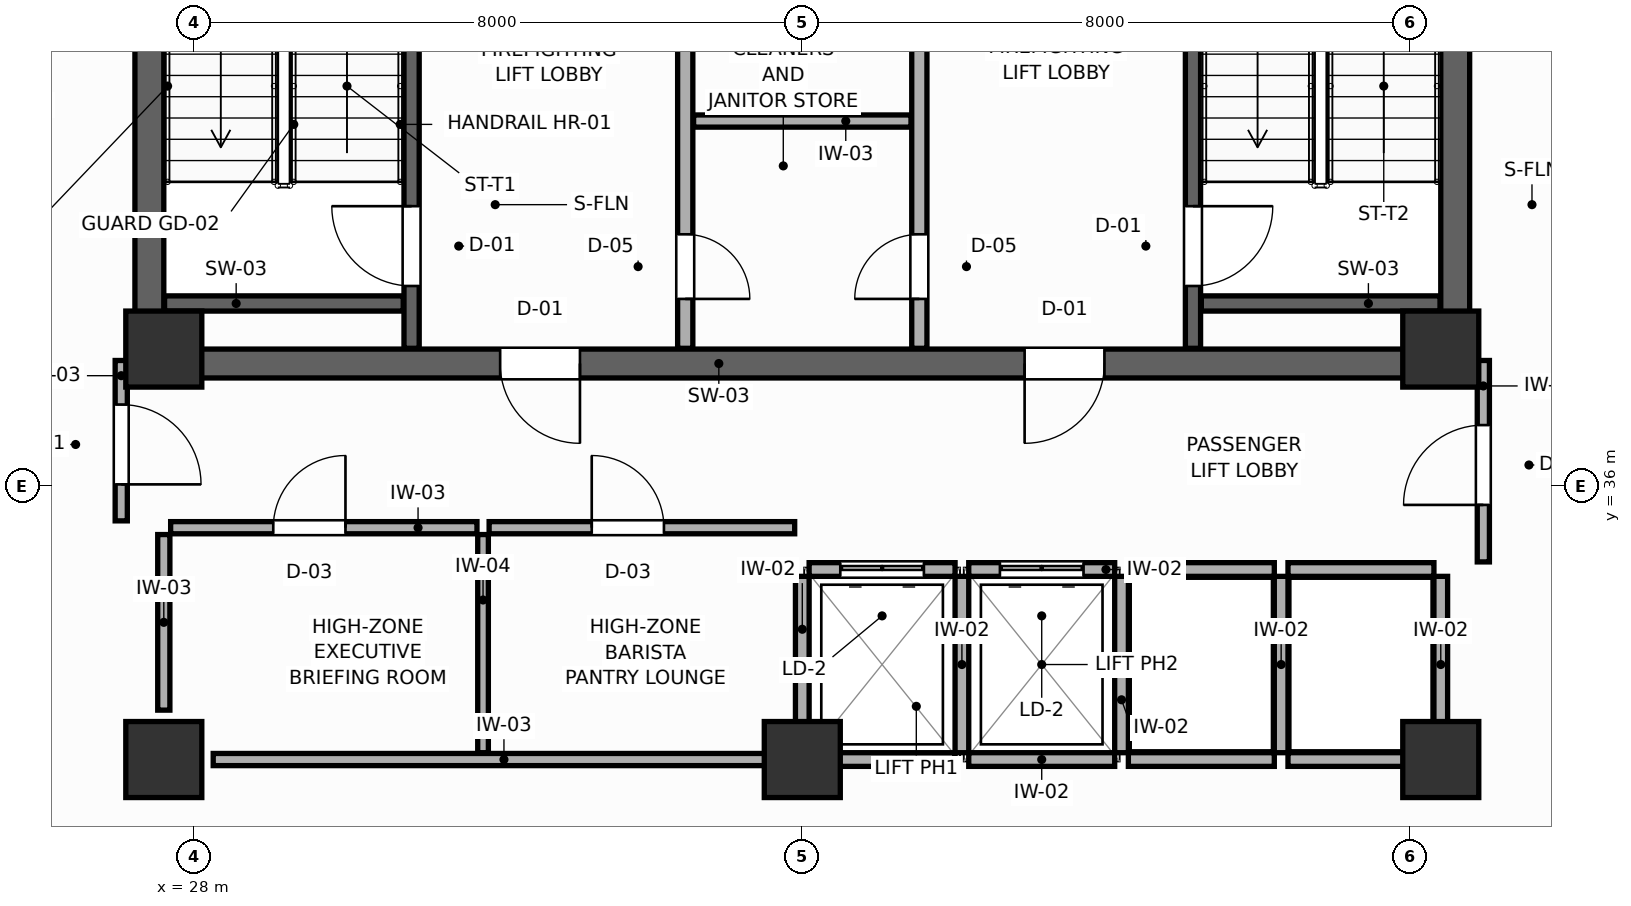
"""IFC4 building model, lengths in metres.
Left out: names, types, materials, properties, quantities, classifications, styles, units other than length and angle.
Written with IfcOpenShell. Run it as: python <this file> out.ifc"""

import sys

from ifc_helpers import new_model, si_unit, direction, frame, frame_2d, origin, origin_2d, place, context, subcontext, project, spatial, rectangle, extrude, source, transform, mapped, element, fill, save


model = new_model("IFC4")
c1 = context("Model", 3, precision=1e-05, world=origin(), true_north=direction((0.0, 1.0)))
c2 = subcontext(c1, "Body", "Model", "MODEL_VIEW")
j1 = project(units=[si_unit("LENGTHUNIT", "METRE"), si_unit("PLANEANGLEUNIT", "RADIAN")], contexts=[c1])
p1 = place(None, origin())
s1 = spatial("IfcSite", under=j1, at=p1, CompositionType="ELEMENT")
p2 = place(p1, origin())
s2 = spatial("IfcBuilding", under=s1, at=p2, CompositionType="ELEMENT")
p3 = place(p2, frame((0.0, 0.0, 213.0)))
s3 = spatial("IfcBuildingStorey", under=s2, at=p3, CompositionType="ELEMENT", Elevation=213.0)
p4 = place(p3, frame((27.22, 37.61, 0.0), z_axis=(0.0, 0.0, 1.0), x_axis=(1.0, 0.0, 0.0)))
e1 = element("IfcWall", 1, at=p4, inside=s3, PredefinedType="SHEAR", context=c2, shape_type="SweptSolid", body=[
    extrude(rectangle(XDim=17.56, YDim=0.38, at=frame_2d((8.78, 0.0))), origin(), (0.0, 0.0, 1.0), 3.6),
])
p5 = place(p4, frame((4.805, 0.0, 0.0)))
e2 = element("IfcOpeningElement", 2, at=p5, cuts=e1, PredefinedType="OPENING", context=c2, shape_type="SweptSolid", body=[
    extrude(rectangle(XDim=1.05, YDim=2.1, at=frame_2d((0.525, 1.05))), frame((0.0, 0.2, 0.0), z_axis=(0.0, -1.0, 0.0), x_axis=(1.0, 0.0, 0.0)), (0.0, 0.0, 1.0), 0.4),
])
p6 = place(p4, frame((11.705, 0.0, 0.0)))
e3 = element("IfcOpeningElement", 3, at=p6, cuts=e1, PredefinedType="OPENING", context=c2, shape_type="SweptSolid", body=[
    extrude(rectangle(XDim=1.05, YDim=2.1, at=frame_2d((0.525, 1.05))), frame((0.0, 0.2, 0.0), z_axis=(0.0, -1.0, 0.0), x_axis=(1.0, 0.0, 0.0)), (0.0, 0.0, 1.0), 0.4),
])
for number, where, z_axis, x_axis in (
    (4, (27.41, 37.8, 0.0), (0.0, 0.0, 1.0), (0.0, 1.0, 0.0)),
    (5, (44.59, 37.8, 0.0), (0.0, 0.0, 1.0), (0.0, 1.0, 0.0)),
):
    element("IfcWall", number, at=place(p3, frame(where, z_axis=z_axis, x_axis=x_axis)), inside=s3, PredefinedType="SHEAR", context=c2, shape_type="SweptSolid", body=[
        extrude(rectangle(XDim=9.0, YDim=0.38, at=frame_2d((4.5, 0.0))), origin(), (0.0, 0.0, 1.0), 3.6),
    ])
m1 = source(origin(), c2, "Body", "SweptSolid", [
    extrude(rectangle(XDim=1.0, YDim=1.0, at=origin_2d()), origin(), (0.0, 0.0, 1.0), 3.6),
])
for number, where, z_axis, x_axis in (
    (6, (27.6, 37.8, 0.0), (0.0, 0.0, 1.0), (1.0, 0.0, 0.0)),
    (7, (44.4, 37.8, 0.0), (0.0, 0.0, 1.0), (1.0, 0.0, 0.0)),
    (8, (27.6, 32.4, 0.0), (0.0, 0.0, 1.0), (1.0, 0.0, 0.0)),
    (9, (44.4, 32.4, 0.0), (0.0, 0.0, 1.0), (1.0, 0.0, 0.0)),
    (10, (36.0, 32.4, 0.0), (0.0, 0.0, 1.0), (1.0, 0.0, 0.0)),
):
    element("IfcColumn", number, at=place(p3, frame(where, z_axis=z_axis, x_axis=x_axis)), inside=s3, PredefinedType="COLUMN", context=c2, shape_type="MappedRepresentation", body=[
        mapped(m1, transform((0.0, 0.0, 0.0), scale=1.0)),
    ])
p7 = place(p3, frame((30.86, 37.81, 0.0), z_axis=(0.0, 0.0, 1.0), x_axis=(0.0, 1.0, 0.0)))
e11 = element("IfcWall", 11, at=p7, inside=s3, PredefinedType="SHEAR", context=c2, shape_type="SweptSolid", body=[
    extrude(rectangle(XDim=8.98, YDim=0.2, at=frame_2d((4.49, 0.0))), origin(), (0.0, 0.0, 1.0), 3.6),
])
p8 = place(p7, frame((0.82, 0.0, 0.0)))
e12 = element("IfcOpeningElement", 12, at=p8, cuts=e11, PredefinedType="OPENING", context=c2, shape_type="SweptSolid", body=[
    extrude(rectangle(XDim=1.05, YDim=2.1, at=frame_2d((0.525, 1.05))), frame((0.0, 0.11, 0.0), z_axis=(0.0, -1.0, 0.0), x_axis=(1.0, 0.0, 0.0)), (0.0, 0.0, 1.0), 0.22),
])
p9 = place(p3, frame((27.61, 38.4, 0.0), z_axis=(0.0, 0.0, 1.0), x_axis=(1.0, 0.0, 0.0)))
e13 = element("IfcWall", 13, at=p9, inside=s3, PredefinedType="SHEAR", context=c2, shape_type="SweptSolid", body=[
    extrude(rectangle(XDim=3.14, YDim=0.2, at=frame_2d((1.57, 0.0))), origin(), (0.0, 0.0, 1.0), 3.6),
])
p10 = place(p3, frame((41.14, 37.81, 0.0), z_axis=(0.0, 0.0, 1.0), x_axis=(0.0, 1.0, 0.0)))
e14 = element("IfcWall", 14, at=p10, inside=s3, PredefinedType="SHEAR", context=c2, shape_type="SweptSolid", body=[
    extrude(rectangle(XDim=8.98, YDim=0.2, at=frame_2d((4.49, 0.0))), origin(), (0.0, 0.0, 1.0), 3.6),
])
p11 = place(p10, frame((0.82, 0.0, 0.0)))
e15 = element("IfcOpeningElement", 15, at=p11, cuts=e14, PredefinedType="OPENING", context=c2, shape_type="SweptSolid", body=[
    extrude(rectangle(XDim=1.05, YDim=2.1, at=frame_2d((0.525, 1.05))), frame((0.0, 0.11, 0.0), z_axis=(0.0, -1.0, 0.0), x_axis=(1.0, 0.0, 0.0)), (0.0, 0.0, 1.0), 0.22),
])
p12 = place(p3, frame((41.25, 38.4, 0.0), z_axis=(0.0, 0.0, 1.0), x_axis=(1.0, 0.0, 0.0)))
e16 = element("IfcWall", 16, at=p12, inside=s3, PredefinedType="SHEAR", context=c2, shape_type="SweptSolid", body=[
    extrude(rectangle(XDim=3.14, YDim=0.2, at=frame_2d((1.57, 0.0))), origin(), (0.0, 0.0, 1.0), 3.6),
])
p13 = place(p3, frame((34.46, 37.81, 0.0), z_axis=(0.0, 0.0, 1.0), x_axis=(0.0, 1.0, 0.0)))
e17 = element("IfcWall", 17, at=p13, inside=s3, PredefinedType="PARTITIONING", context=c2, shape_type="SweptSolid", body=[
    extrude(rectangle(XDim=8.98, YDim=0.2, at=frame_2d((4.49, 0.0))), origin(), (0.0, 0.0, 1.0), 3.41),
])
p14 = place(p13, frame((0.65, 0.0, 0.0)))
e18 = element("IfcOpeningElement", 18, at=p14, cuts=e17, PredefinedType="OPENING", context=c2, shape_type="SweptSolid", body=[
    extrude(rectangle(XDim=0.85, YDim=2.05, at=frame_2d((0.425, 1.025))), frame((0.0, 0.11, 0.0), z_axis=(0.0, -1.0, 0.0), x_axis=(1.0, 0.0, 0.0)), (0.0, 0.0, 1.0), 0.22),
])
p15 = place(p3, frame((37.54, 37.81, 0.0), z_axis=(0.0, 0.0, 1.0), x_axis=(0.0, 1.0, 0.0)))
e19 = element("IfcWall", 19, at=p15, inside=s3, PredefinedType="PARTITIONING", context=c2, shape_type="SweptSolid", body=[
    extrude(rectangle(XDim=8.98, YDim=0.2, at=frame_2d((4.49, 0.0))), origin(), (0.0, 0.0, 1.0), 3.41),
])
p16 = place(p15, frame((0.65, 0.0, 0.0)))
e20 = element("IfcOpeningElement", 20, at=p16, cuts=e19, PredefinedType="OPENING", context=c2, shape_type="SweptSolid", body=[
    extrude(rectangle(XDim=0.85, YDim=2.05, at=frame_2d((0.425, 1.025))), frame((0.0, 0.11, 0.0), z_axis=(0.0, -1.0, 0.0), x_axis=(1.0, 0.0, 0.0)), (0.0, 0.0, 1.0), 0.22),
])
p17 = place(p3, frame((34.57, 40.8, 0.0), z_axis=(0.0, 0.0, 1.0), x_axis=(1.0, 0.0, 0.0)))
e21 = element("IfcWall", 21, at=p17, inside=s3, PredefinedType="PARTITIONING", context=c2, shape_type="SweptSolid", body=[
    extrude(rectangle(XDim=2.86, YDim=0.16, at=frame_2d((1.43, 0.0))), origin(), (0.0, 0.0, 1.0), 3.41),
])
p18 = place(p3, frame((36.09, 34.9, 0.0), z_axis=(0.0, 0.0, 1.0), x_axis=(1.0, 0.0, 0.0)))
e22 = element("IfcWall", 22, at=p18, inside=s3, PredefinedType="PARTITIONING", context=c2, shape_type="SweptSolid", body=[
    extrude(rectangle(XDim=1.92, YDim=0.18, at=frame_2d((0.96, 0.0))), origin(), (0.0, 0.0, 1.0), 3.41),
])
p19 = place(p18, frame((0.41, 0.0, 0.0)))
e23 = element("IfcOpeningElement", 23, at=p19, cuts=e22, PredefinedType="OPENING", context=c2, shape_type="SweptSolid", body=[
    extrude(rectangle(XDim=1.1, YDim=2.1, at=frame_2d((0.55, 1.05))), frame((0.0, 0.1, 0.0), z_axis=(0.0, -1.0, 0.0), x_axis=(1.0, 0.0, 0.0)), (0.0, 0.0, 1.0), 0.2),
])
p20 = place(p3, frame((36.09, 32.4, 0.0), z_axis=(0.0, 0.0, 1.0), x_axis=(1.0, 0.0, 0.0)))
e24 = element("IfcWall", 24, at=p20, inside=s3, PredefinedType="PARTITIONING", context=c2, shape_type="SweptSolid", body=[
    extrude(rectangle(XDim=1.92, YDim=0.18, at=frame_2d((0.96, 0.0))), origin(), (0.0, 0.0, 1.0), 2.17),
])
p21 = place(p3, frame((36.0, 32.49, 0.0), z_axis=(0.0, 0.0, 1.0), x_axis=(0.0, 1.0, 0.0)))
e25 = element("IfcWall", 25, at=p21, inside=s3, PredefinedType="PARTITIONING", context=c2, shape_type="SweptSolid", body=[
    extrude(rectangle(XDim=2.32, YDim=0.18, at=frame_2d((1.16, 0.0))), origin(), (0.0, 0.0, 1.0), 3.41),
])
p22 = place(p3, frame((38.19, 34.9, 0.0), z_axis=(0.0, 0.0, 1.0), x_axis=(1.0, 0.0, 0.0)))
e26 = element("IfcWall", 26, at=p22, inside=s3, PredefinedType="PARTITIONING", context=c2, shape_type="SweptSolid", body=[
    extrude(rectangle(XDim=1.92, YDim=0.18, at=frame_2d((0.96, 0.0))), origin(), (0.0, 0.0, 1.0), 3.41),
])
p23 = place(p22, frame((0.41, 0.0, 0.0)))
e27 = element("IfcOpeningElement", 27, at=p23, cuts=e26, PredefinedType="OPENING", context=c2, shape_type="SweptSolid", body=[
    extrude(rectangle(XDim=1.1, YDim=2.1, at=frame_2d((0.55, 1.05))), frame((0.0, 0.1, 0.0), z_axis=(0.0, -1.0, 0.0), x_axis=(1.0, 0.0, 0.0)), (0.0, 0.0, 1.0), 0.2),
])
p24 = place(p3, frame((38.19, 32.4, 0.0), z_axis=(0.0, 0.0, 1.0), x_axis=(1.0, 0.0, 0.0)))
e28 = element("IfcWall", 28, at=p24, inside=s3, PredefinedType="PARTITIONING", context=c2, shape_type="SweptSolid", body=[
    extrude(rectangle(XDim=1.92, YDim=0.18, at=frame_2d((0.96, 0.0))), origin(), (0.0, 0.0, 1.0), 2.17),
])
p25 = place(p3, frame((38.1, 32.49, 0.0), z_axis=(0.0, 0.0, 1.0), x_axis=(0.0, 1.0, 0.0)))
e29 = element("IfcWall", 29, at=p25, inside=s3, PredefinedType="PARTITIONING", context=c2, shape_type="SweptSolid", body=[
    extrude(rectangle(XDim=2.32, YDim=0.18, at=frame_2d((1.16, 0.0))), origin(), (0.0, 0.0, 1.0), 3.41),
])
p26 = place(p3, frame((40.29, 34.9, 0.0), z_axis=(0.0, 0.0, 1.0), x_axis=(1.0, 0.0, 0.0)))
e30 = element("IfcWall", 30, at=p26, inside=s3, PredefinedType="PARTITIONING", context=c2, shape_type="SweptSolid", body=[
    extrude(rectangle(XDim=1.92, YDim=0.18, at=frame_2d((0.96, 0.0))), origin(), (0.0, 0.0, 1.0), 3.41),
])
p27 = place(p3, frame((40.29, 32.4, 0.0), z_axis=(0.0, 0.0, 1.0), x_axis=(1.0, 0.0, 0.0)))
e31 = element("IfcWall", 31, at=p27, inside=s3, PredefinedType="PARTITIONING", context=c2, shape_type="SweptSolid", body=[
    extrude(rectangle(XDim=1.92, YDim=0.18, at=frame_2d((0.96, 0.0))), origin(), (0.0, 0.0, 1.0), 2.17),
])
p28 = place(p3, frame((40.2, 32.49, 0.0), z_axis=(0.0, 0.0, 1.0), x_axis=(0.0, 1.0, 0.0)))
e32 = element("IfcWall", 32, at=p28, inside=s3, PredefinedType="PARTITIONING", context=c2, shape_type="SweptSolid", body=[
    extrude(rectangle(XDim=2.32, YDim=0.18, at=frame_2d((1.16, 0.0))), origin(), (0.0, 0.0, 1.0), 3.41),
])
p29 = place(p3, frame((42.39, 34.9, 0.0), z_axis=(0.0, 0.0, 1.0), x_axis=(1.0, 0.0, 0.0)))
e33 = element("IfcWall", 33, at=p29, inside=s3, PredefinedType="PARTITIONING", context=c2, shape_type="SweptSolid", body=[
    extrude(rectangle(XDim=1.92, YDim=0.18, at=frame_2d((0.96, 0.0))), origin(), (0.0, 0.0, 1.0), 3.41),
])
p30 = place(p3, frame((42.39, 32.4, 0.0), z_axis=(0.0, 0.0, 1.0), x_axis=(1.0, 0.0, 0.0)))
e34 = element("IfcWall", 34, at=p30, inside=s3, PredefinedType="PARTITIONING", context=c2, shape_type="SweptSolid", body=[
    extrude(rectangle(XDim=1.92, YDim=0.18, at=frame_2d((0.96, 0.0))), origin(), (0.0, 0.0, 1.0), 2.17),
])
for number, where, z_axis, x_axis in (
    (35, (42.3, 32.49, 0.0), (0.0, 0.0, 1.0), (0.0, 1.0, 0.0)),
    (36, (44.4, 32.49, 0.0), (0.0, 0.0, 1.0), (0.0, 1.0, 0.0)),
):
    element("IfcWall", number, at=place(p3, frame(where, z_axis=z_axis, x_axis=x_axis)), inside=s3, PredefinedType="PARTITIONING", context=c2, shape_type="SweptSolid", body=[
        extrude(rectangle(XDim=2.32, YDim=0.18, at=frame_2d((1.16, 0.0))), origin(), (0.0, 0.0, 1.0), 3.41),
    ])
p31 = place(p3, frame((28.25, 32.4, 0.0), z_axis=(0.0, 0.0, 1.0), x_axis=(1.0, 0.0, 0.0)))
e37 = element("IfcWall", 37, at=p31, inside=s3, PredefinedType="PARTITIONING", context=c2, shape_type="SweptSolid", body=[
    extrude(rectangle(XDim=7.65, YDim=0.16, at=frame_2d((3.825, 0.0))), origin(), (0.0, 0.0, 1.0), 2.17),
])
p32 = place(p3, frame((27.6, 33.05, 0.0), z_axis=(0.0, 0.0, 1.0), x_axis=(0.0, 1.0, 0.0)))
e38 = element("IfcWall", 38, at=p32, inside=s3, PredefinedType="PARTITIONING", context=c2, shape_type="SweptSolid", body=[
    extrude(rectangle(XDim=2.31, YDim=0.16, at=frame_2d((1.155, 0.0))), origin(), (0.0, 0.0, 1.0), 3.41),
])
p33 = place(p3, frame((31.8, 32.49, 0.0), z_axis=(0.0, 0.0, 1.0), x_axis=(0.0, 1.0, 0.0)))
e39 = element("IfcWall", 39, at=p33, inside=s3, PredefinedType="PARTITIONING", context=c2, shape_type="SweptSolid", body=[
    extrude(rectangle(XDim=2.87, YDim=0.14, at=frame_2d((1.435, 0.0))), origin(), (0.0, 0.0, 1.0), 3.41),
])
p34 = place(p3, frame((27.69, 35.45, 0.0), z_axis=(0.0, 0.0, 1.0), x_axis=(1.0, 0.0, 0.0)))
e40 = element("IfcWall", 40, at=p34, inside=s3, PredefinedType="PARTITIONING", context=c2, shape_type="SweptSolid", body=[
    extrude(rectangle(XDim=4.03, YDim=0.16, at=frame_2d((2.015, 0.0))), origin(), (0.0, 0.0, 1.0), 3.41),
])
p35 = place(p34, frame((1.35, 0.0, 0.0)))
e41 = element("IfcOpeningElement", 41, at=p35, cuts=e40, PredefinedType="OPENING", context=c2, shape_type="SweptSolid", body=[
    extrude(rectangle(XDim=0.95, YDim=2.05, at=frame_2d((0.475, 1.025))), frame((0.0, 0.09, 0.0), z_axis=(0.0, -1.0, 0.0), x_axis=(1.0, 0.0, 0.0)), (0.0, 0.0, 1.0), 0.18),
])
p36 = place(p3, frame((31.88, 35.45, 0.0), z_axis=(0.0, 0.0, 1.0), x_axis=(1.0, 0.0, 0.0)))
e42 = element("IfcWall", 42, at=p36, inside=s3, PredefinedType="PARTITIONING", context=c2, shape_type="SweptSolid", body=[
    extrude(rectangle(XDim=4.02, YDim=0.16, at=frame_2d((2.01, 0.0))), origin(), (0.0, 0.0, 1.0), 3.41),
])
p37 = place(p36, frame((1.35, 0.0, 0.0)))
e43 = element("IfcOpeningElement", 43, at=p37, cuts=e42, PredefinedType="OPENING", context=c2, shape_type="SweptSolid", body=[
    extrude(rectangle(XDim=0.95, YDim=2.05, at=frame_2d((0.475, 1.025))), frame((0.0, 0.09, 0.0), z_axis=(0.0, -1.0, 0.0), x_axis=(1.0, 0.0, 0.0)), (0.0, 0.0, 1.0), 0.18),
])
p38 = place(p3, frame((27.04, 35.54, 0.0), z_axis=(0.0, 0.0, 1.0), x_axis=(0.0, 1.0, 0.0)))
e44 = element("IfcWall", 44, at=p38, inside=s3, PredefinedType="PARTITIONING", context=c2, shape_type="SweptSolid", body=[
    extrude(rectangle(XDim=2.11, YDim=0.16, at=frame_2d((1.055, 0.0))), origin(), (0.0, 0.0, 1.0), 3.41),
])
p39 = place(p38, frame((0.48, 0.0, 0.0)))
e45 = element("IfcOpeningElement", 45, at=p39, cuts=e44, PredefinedType="OPENING", context=c2, shape_type="SweptSolid", body=[
    extrude(rectangle(XDim=1.05, YDim=2.1, at=frame_2d((0.525, 1.05))), frame((0.0, 0.09, 0.0), z_axis=(0.0, -1.0, 0.0), x_axis=(1.0, 0.0, 0.0)), (0.0, 0.0, 1.0), 0.18),
])
p40 = place(p3, frame((44.96, 35.0, 0.0), z_axis=(0.0, 0.0, 1.0), x_axis=(0.0, 1.0, 0.0)))
e46 = element("IfcWall", 46, at=p40, inside=s3, PredefinedType="PARTITIONING", context=c2, shape_type="SweptSolid", body=[
    extrude(rectangle(XDim=2.65, YDim=0.16, at=frame_2d((1.325, 0.0))), origin(), (0.0, 0.0, 1.0), 3.41),
])
p41 = place(p40, frame((0.75, 0.0, 0.0)))
e47 = element("IfcOpeningElement", 47, at=p41, cuts=e46, PredefinedType="OPENING", context=c2, shape_type="SweptSolid", body=[
    extrude(rectangle(XDim=1.05, YDim=2.1, at=frame_2d((0.525, 1.05))), frame((0.0, 0.09, 0.0), z_axis=(0.0, -1.0, 0.0), x_axis=(1.0, 0.0, 0.0)), (0.0, 0.0, 1.0), 0.18),
])
p42 = place(p8, origin())
e48 = element("IfcDoor", 48, at=p42, inside=s3, OperationType="SINGLE_SWING_RIGHT", PredefinedType="DOOR", context=c2, shape_type="SweptSolid", body=[
    extrude(rectangle(XDim=1.05, YDim=2.1, at=frame_2d((0.525, 1.05))), frame((0.0, 0.025, 0.0), z_axis=(0.0, -1.0, 0.0), x_axis=(1.0, 0.0, 0.0)), (0.0, 0.0, 1.0), 0.05),
])
fill(e12, e48)
p43 = place(p11, frame((1.05, 0.0, 0.0), z_axis=(0.0, 0.0, 1.0), x_axis=(-1.0, 0.0, 0.0)))
e49 = element("IfcDoor", 49, at=p43, inside=s3, OperationType="SINGLE_SWING_LEFT", PredefinedType="DOOR", context=c2, shape_type="SweptSolid", body=[
    extrude(rectangle(XDim=1.05, YDim=2.1, at=frame_2d((0.525, 1.05))), frame((0.0, 0.025, 0.0), z_axis=(0.0, -1.0, 0.0), x_axis=(1.0, 0.0, 0.0)), (0.0, 0.0, 1.0), 0.05),
])
fill(e15, e49)
p44 = place(p14, frame((0.85, 0.0, 0.0), z_axis=(0.0, 0.0, 1.0), x_axis=(-1.0, 0.0, 0.0)))
e50 = element("IfcDoor", 50, at=p44, inside=s3, OperationType="SINGLE_SWING_RIGHT", PredefinedType="DOOR", context=c2, shape_type="SweptSolid", body=[
    extrude(rectangle(XDim=0.85, YDim=2.05, at=frame_2d((0.425, 1.025))), frame((0.0, 0.025, 0.0), z_axis=(0.0, -1.0, 0.0), x_axis=(1.0, 0.0, 0.0)), (0.0, 0.0, 1.0), 0.05),
])
fill(e18, e50)
p45 = place(p16, origin())
e51 = element("IfcDoor", 51, at=p45, inside=s3, OperationType="SINGLE_SWING_LEFT", PredefinedType="DOOR", context=c2, shape_type="SweptSolid", body=[
    extrude(rectangle(XDim=0.85, YDim=2.05, at=frame_2d((0.425, 1.025))), frame((0.0, 0.025, 0.0), z_axis=(0.0, -1.0, 0.0), x_axis=(1.0, 0.0, 0.0)), (0.0, 0.0, 1.0), 0.05),
])
fill(e20, e51)
p46 = place(p19, origin())
e52 = element("IfcDoor", 52, at=p46, inside=s3, OperationType="DOUBLE_DOOR_SLIDING", PredefinedType="DOOR", context=c2, shape_type="SweptSolid", body=[
    extrude(rectangle(XDim=1.1, YDim=2.1, at=frame_2d((0.55, 1.05))), frame((0.0, 0.025, 0.0), z_axis=(0.0, -1.0, 0.0), x_axis=(1.0, 0.0, 0.0)), (0.0, 0.0, 1.0), 0.05),
])
fill(e23, e52)
p47 = place(p23, origin())
e53 = element("IfcDoor", 53, at=p47, inside=s3, OperationType="DOUBLE_DOOR_SLIDING", PredefinedType="DOOR", context=c2, shape_type="SweptSolid", body=[
    extrude(rectangle(XDim=1.1, YDim=2.1, at=frame_2d((0.55, 1.05))), frame((0.0, 0.025, 0.0), z_axis=(0.0, -1.0, 0.0), x_axis=(1.0, 0.0, 0.0)), (0.0, 0.0, 1.0), 0.05),
])
fill(e27, e53)
p48 = place(p35, origin())
e54 = element("IfcDoor", 54, at=p48, inside=s3, OperationType="SINGLE_SWING_RIGHT", PredefinedType="DOOR", context=c2, shape_type="SweptSolid", body=[
    extrude(rectangle(XDim=0.95, YDim=2.05, at=frame_2d((0.475, 1.025))), frame((0.0, 0.025, 0.0), z_axis=(0.0, -1.0, 0.0), x_axis=(1.0, 0.0, 0.0)), (0.0, 0.0, 1.0), 0.05),
])
fill(e41, e54)
p49 = place(p37, origin())
e55 = element("IfcDoor", 55, at=p49, inside=s3, OperationType="SINGLE_SWING_LEFT", PredefinedType="DOOR", context=c2, shape_type="SweptSolid", body=[
    extrude(rectangle(XDim=0.95, YDim=2.05, at=frame_2d((0.475, 1.025))), frame((0.0, 0.025, 0.0), z_axis=(0.0, -1.0, 0.0), x_axis=(1.0, 0.0, 0.0)), (0.0, 0.0, 1.0), 0.05),
])
fill(e43, e55)
p50 = place(p39, frame((1.05, 0.0, 0.0), z_axis=(0.0, 0.0, 1.0), x_axis=(-1.0, 0.0, 0.0)))
e56 = element("IfcDoor", 56, at=p50, inside=s3, OperationType="SINGLE_SWING_RIGHT", PredefinedType="DOOR", context=c2, shape_type="SweptSolid", body=[
    extrude(rectangle(XDim=1.05, YDim=2.1, at=frame_2d((0.525, 1.05))), frame((0.0, 0.025, 0.0), z_axis=(0.0, -1.0, 0.0), x_axis=(1.0, 0.0, 0.0)), (0.0, 0.0, 1.0), 0.05),
])
fill(e45, e56)
p51 = place(p41, origin())
e57 = element("IfcDoor", 57, at=p51, inside=s3, OperationType="SINGLE_SWING_LEFT", PredefinedType="DOOR", context=c2, shape_type="SweptSolid", body=[
    extrude(rectangle(XDim=1.05, YDim=2.1, at=frame_2d((0.525, 1.05))), frame((0.0, 0.025, 0.0), z_axis=(0.0, -1.0, 0.0), x_axis=(1.0, 0.0, 0.0)), (0.0, 0.0, 1.0), 0.05),
])
fill(e47, e57)
p52 = place(p5, frame((1.05, 0.0, 0.0), z_axis=(0.0, 0.0, 1.0), x_axis=(-1.0, 0.0, 0.0)))
e58 = element("IfcDoor", 58, at=p52, inside=s3, OperationType="SINGLE_SWING_LEFT", PredefinedType="DOOR", context=c2, shape_type="SweptSolid", body=[
    extrude(rectangle(XDim=1.05, YDim=2.1, at=frame_2d((0.525, 1.05))), frame((0.0, 0.025, 0.0), z_axis=(0.0, -1.0, 0.0), x_axis=(1.0, 0.0, 0.0)), (0.0, 0.0, 1.0), 0.05),
])
fill(e2, e58)
p53 = place(p6, frame((1.05, 0.0, 0.0), z_axis=(0.0, 0.0, 1.0), x_axis=(-1.0, 0.0, 0.0)))
e59 = element("IfcDoor", 59, at=p53, inside=s3, OperationType="SINGLE_SWING_RIGHT", PredefinedType="DOOR", context=c2, shape_type="SweptSolid", body=[
    extrude(rectangle(XDim=1.05, YDim=2.1, at=frame_2d((0.525, 1.05))), frame((0.0, 0.025, 0.0), z_axis=(0.0, -1.0, 0.0), x_axis=(1.0, 0.0, 0.0)), (0.0, 0.0, 1.0), 0.05),
])
fill(e3, e59)
save(model, sys.argv[1])
